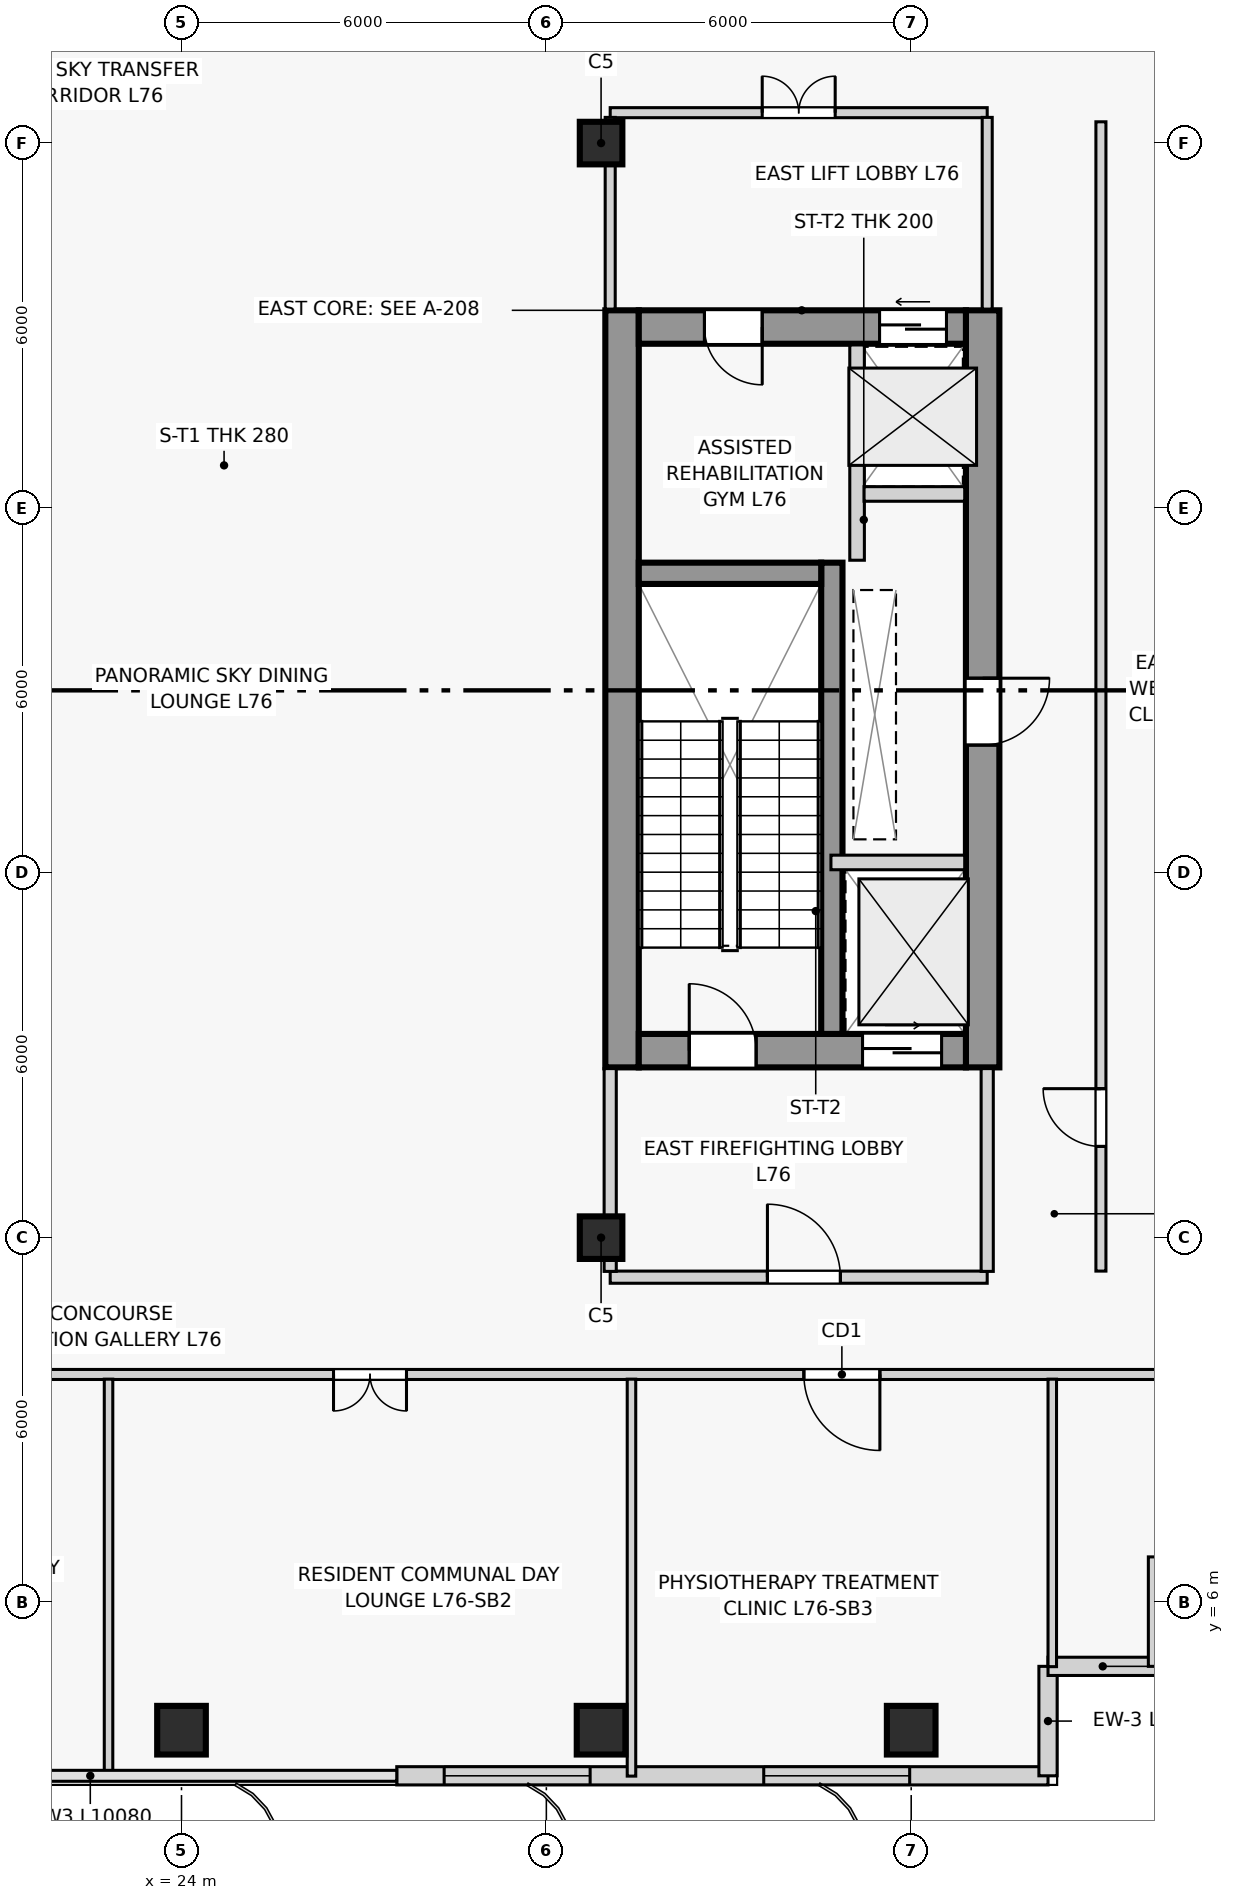
"""IFC4 building model, lengths in metres.
Left out: names, types, materials, properties, quantities, classifications, styles, units other than length and angle.
Written with IfcOpenShell. Run it as: python <this file> out.ifc"""

import sys

from ifc_helpers import new_model, si_unit, direction, frame, frame_2d, origin, origin_2d, place, context, subcontext, project, spatial, rectangle, extrude, source, transform, mapped, element, fill, save


model = new_model("IFC4")
c1 = context("Model", 3, precision=1e-05, world=origin(), true_north=direction((0.0, 1.0)))
c2 = subcontext(c1, "Body", "Model", "MODEL_VIEW")
j1 = project(units=[si_unit("LENGTHUNIT", "METRE"), si_unit("PLANEANGLEUNIT", "RADIAN")], contexts=[c1])
p1 = place(None, origin())
s1 = spatial("IfcSite", under=j1, at=p1, CompositionType="ELEMENT")
p2 = place(p1, origin())
s2 = spatial("IfcBuilding", under=s1, at=p2, CompositionType="ELEMENT")
p3 = place(p2, frame((0.0, 0.0, 289.5)))
s3 = spatial("IfcBuildingStorey", under=s2, at=p3, CompositionType="ELEMENT", Elevation=289.5)
p4 = place(p3, frame((31.245, 14.8, 0.0), z_axis=(0.0, 0.0, 1.0), x_axis=(0.0, 1.0, 0.0)))
e1 = element("IfcWall", 1, at=p4, inside=s3, PredefinedType="SHEAR", context=c2, shape_type="SweptSolid", body=[
    extrude(rectangle(XDim=12.45, YDim=0.55, at=frame_2d((6.225, 0.0))), origin(), (0.0, 0.0, 1.0), 4.2),
])
p5 = place(p3, frame((37.175, 14.8, 0.0), z_axis=(0.0, 0.0, 1.0), x_axis=(0.0, 1.0, 0.0)))
e2 = element("IfcWall", 2, at=p5, inside=s3, PredefinedType="SHEAR", context=c2, shape_type="SweptSolid", body=[
    extrude(rectangle(XDim=12.45, YDim=0.55, at=frame_2d((6.225, 0.0))), origin(), (0.0, 0.0, 1.0), 4.2),
])
p6 = place(p5, frame((5.3, 0.0, 0.0)))
e3 = element("IfcOpeningElement", 3, at=p6, cuts=e2, PredefinedType="OPENING", context=c2, shape_type="SweptSolid", body=[
    extrude(rectangle(XDim=1.1, YDim=2.2, at=frame_2d((0.55, 1.1))), frame((0.0, 0.285, 0.0), z_axis=(0.0, -1.0, 0.0), x_axis=(1.0, 0.0, 0.0)), (0.0, 0.0, 1.0), 0.57),
])
p7 = place(p3, frame((31.52, 15.075, 0.0), z_axis=(0.0, 0.0, 1.0), x_axis=(1.0, 0.0, 0.0)))
e4 = element("IfcWall", 4, at=p7, inside=s3, PredefinedType="SHEAR", context=c2, shape_type="SweptSolid", body=[
    extrude(rectangle(XDim=5.38, YDim=0.55, at=frame_2d((2.69, 0.0))), origin(), (0.0, 0.0, 1.0), 4.2),
])
p8 = place(p7, frame((0.83, 0.0, 0.0)))
e5 = element("IfcOpeningElement", 5, at=p8, cuts=e4, PredefinedType="OPENING", context=c2, shape_type="SweptSolid", body=[
    extrude(rectangle(XDim=1.1, YDim=2.2, at=frame_2d((0.55, 1.1))), frame((0.0, 0.285, 0.0), z_axis=(0.0, -1.0, 0.0), x_axis=(1.0, 0.0, 0.0)), (0.0, 0.0, 1.0), 0.57),
])
p9 = place(p7, frame((3.68, 0.0, 0.0)))
e6 = element("IfcOpeningElement", 6, at=p9, cuts=e4, PredefinedType="OPENING", context=c2, shape_type="SweptSolid", body=[
    extrude(rectangle(XDim=1.3, YDim=2.2, at=frame_2d((0.65, 1.1))), frame((0.0, 0.285, 0.0), z_axis=(0.0, -1.0, 0.0), x_axis=(1.0, 0.0, 0.0)), (0.0, 0.0, 1.0), 0.57),
])
p10 = place(p3, frame((31.52, 26.975, 0.0), z_axis=(0.0, 0.0, 1.0), x_axis=(1.0, 0.0, 0.0)))
e7 = element("IfcWall", 7, at=p10, inside=s3, PredefinedType="SHEAR", context=c2, shape_type="SweptSolid", body=[
    extrude(rectangle(XDim=5.38, YDim=0.55, at=frame_2d((2.69, 0.0))), origin(), (0.0, 0.0, 1.0), 4.2),
])
p11 = place(p10, frame((1.08, 0.0, 0.0)))
e8 = element("IfcOpeningElement", 8, at=p11, cuts=e7, PredefinedType="OPENING", context=c2, shape_type="SweptSolid", body=[
    extrude(rectangle(XDim=0.95, YDim=2.1, at=frame_2d((0.475, 1.05))), frame((0.0, 0.285, 0.0), z_axis=(0.0, -1.0, 0.0), x_axis=(1.0, 0.0, 0.0)), (0.0, 0.0, 1.0), 0.57),
])
p12 = place(p10, frame((3.96, 0.0, 0.0)))
e9 = element("IfcOpeningElement", 9, at=p12, cuts=e7, PredefinedType="OPENING", context=c2, shape_type="SweptSolid", body=[
    extrude(rectangle(XDim=1.1, YDim=2.2, at=frame_2d((0.55, 1.1))), frame((0.0, 0.285, 0.0), z_axis=(0.0, -1.0, 0.0), x_axis=(1.0, 0.0, 0.0)), (0.0, 0.0, 1.0), 0.57),
])
p13 = place(p3, frame((34.695, 15.35, 0.0), z_axis=(0.0, 0.0, 1.0), x_axis=(0.0, 1.0, 0.0)))
e10 = element("IfcWall", 10, at=p13, inside=s3, PredefinedType="SHEAR", context=c2, shape_type="SweptSolid", body=[
    extrude(rectangle(XDim=7.75, YDim=0.35, at=frame_2d((3.875, 0.0))), origin(), (0.0, 0.0, 1.0), 4.2),
])
p14 = place(p3, frame((31.52, 22.925, 0.0), z_axis=(0.0, 0.0, 1.0), x_axis=(1.0, 0.0, 0.0)))
e11 = element("IfcWall", 11, at=p14, inside=s3, PredefinedType="SHEAR", context=c2, shape_type="SweptSolid", body=[
    extrude(rectangle(XDim=3.0, YDim=0.35, at=frame_2d((1.5, 0.0))), origin(), (0.0, 0.0, 1.0), 4.2),
])
m1 = source(origin(), c2, "Body", "SweptSolid", [
    extrude(rectangle(XDim=0.8, YDim=0.8, at=origin_2d()), origin(), (0.0, 0.0, 1.0), 4.2),
])
for number, where, z_axis, x_axis in (
    (12, (24.0, 3.9, 0.0), (0.0, 0.0, 1.0), (1.0, 0.0, 0.0)),
    (13, (30.9, 3.9, 0.0), (0.0, 0.0, 1.0), (1.0, 0.0, 0.0)),
    (14, (36.0, 3.9, 0.0), (0.0, 0.0, 1.0), (1.0, 0.0, 0.0)),
):
    element("IfcColumn", number, at=place(p3, frame(where, z_axis=z_axis, x_axis=x_axis)), inside=s3, PredefinedType="COLUMN", context=c2, shape_type="MappedRepresentation", body=[
        mapped(m1, transform((0.0, 0.0, 0.0), scale=1.0)),
    ])
m2 = source(origin(), c2, "Body", "SweptSolid", [
    extrude(rectangle(XDim=0.7, YDim=0.7, at=origin_2d()), origin(), (0.0, 0.0, 1.0), 4.2),
])
for number, where, z_axis, x_axis in (
    (15, (30.9, 12.0, 0.0), (0.0, 0.0, 1.0), (1.0, 0.0, 0.0)),
    (16, (30.9, 30.0, 0.0), (0.0, 0.0, 1.0), (1.0, 0.0, 0.0)),
):
    element("IfcColumn", number, at=place(p3, frame(where, z_axis=z_axis, x_axis=x_axis)), inside=s3, PredefinedType="COLUMN", context=c2, shape_type="MappedRepresentation", body=[
        mapped(m2, transform((0.0, 0.0, 0.0), scale=1.0)),
    ])
p15 = place(p3, frame((27.54, 3.15, 0.0), z_axis=(0.0, 0.0, 1.0), x_axis=(1.0, 0.0, 0.0)))
e17 = element("IfcWall", 17, at=p15, inside=s3, PredefinedType="SOLIDWALL", context=c2, shape_type="SweptSolid", body=[
    extrude(rectangle(XDim=10.71, YDim=0.3, at=frame_2d((5.355, 0.0))), origin(), (0.0, 0.0, 1.0), 3.92),
])
p16 = place(p15, frame((0.78, 0.0, 0.8)))
e18 = element("IfcOpeningElement", 18, at=p16, cuts=e17, PredefinedType="OPENING", context=c2, shape_type="SweptSolid", body=[
    extrude(rectangle(XDim=2.4, YDim=2.1, at=frame_2d((1.2, 1.05))), frame((0.0, 0.16, 0.0), z_axis=(0.0, -1.0, 0.0), x_axis=(1.0, 0.0, 0.0)), (0.0, 0.0, 1.0), 0.32),
])
p17 = place(p15, frame((6.035, 0.0, 0.8)))
e19 = element("IfcOpeningElement", 19, at=p17, cuts=e17, PredefinedType="OPENING", context=c2, shape_type="SweptSolid", body=[
    extrude(rectangle(XDim=2.4, YDim=2.1, at=frame_2d((1.2, 1.05))), frame((0.0, 0.16, 0.0), z_axis=(0.0, -1.0, 0.0), x_axis=(1.0, 0.0, 0.0)), (0.0, 0.0, 1.0), 0.32),
])
for number, where, z_axis, x_axis in (
    (20, (38.25, 3.15, 0.0), (0.0, 0.0, 1.0), (0.0, 1.0, 0.0)),
    (21, (38.25, 4.95, 0.0), (0.0, 0.0, 1.0), (1.0, 0.0, 0.0)),
    (22, (40.05, 4.95, 0.0), (0.0, 0.0, 1.0), (0.0, 1.0, 0.0)),
):
    element("IfcWall", number, at=place(p3, frame(where, z_axis=z_axis, x_axis=x_axis)), inside=s3, PredefinedType="SOLIDWALL", context=c2, shape_type="SweptSolid", body=[
        extrude(rectangle(XDim=1.8, YDim=0.3, at=frame_2d((0.9, 0.0))), origin(), (0.0, 0.0, 1.0), 3.92),
    ])
p18 = place(p3, frame((34.68, 18.17, 0.0), z_axis=(0.0, 0.0, 1.0), x_axis=(1.0, 0.0, 0.0)))
e23 = element("IfcWall", 23, at=p18, inside=s3, PredefinedType="PARTITIONING", context=c2, shape_type="SweptSolid", body=[
    extrude(rectangle(XDim=2.2, YDim=0.24, at=frame_2d((1.1, 0.0))), origin(), (0.0, 0.0, 1.0), 3.92),
])
p19 = place(p3, frame((31.05, 11.35, 0.0), z_axis=(0.0, 0.0, 1.0), x_axis=(1.0, 0.0, 0.0)))
e24 = element("IfcWall", 24, at=p19, inside=s3, PredefinedType="PARTITIONING", context=c2, shape_type="SweptSolid", body=[
    extrude(rectangle(XDim=6.2, YDim=0.2, at=frame_2d((3.1, 0.0))), origin(), (0.0, 0.0, 1.0), 3.92),
])
p20 = place(p19, frame((2.586, 0.0, 0.0)))
e25 = element("IfcOpeningElement", 25, at=p20, cuts=e24, PredefinedType="OPENING", context=c2, shape_type="SweptSolid", body=[
    extrude(rectangle(XDim=1.2, YDim=2.2, at=frame_2d((0.6, 1.1))), frame((0.0, 0.11, 0.0), z_axis=(0.0, -1.0, 0.0), x_axis=(1.0, 0.0, 0.0)), (0.0, 0.0, 1.0), 0.22),
])
p21 = place(p3, frame((31.05, 11.445, 0.0), z_axis=(0.0, 0.0, 1.0), x_axis=(0.0, 1.0, 0.0)))
e26 = element("IfcWall", 26, at=p21, inside=s3, PredefinedType="PARTITIONING", context=c2, shape_type="SweptSolid", body=[
    extrude(rectangle(XDim=3.335, YDim=0.2, at=frame_2d((1.667, 0.0))), origin(), (0.0, 0.0, 1.0), 3.07),
])
p22 = place(p3, frame((37.25, 11.445, 0.0), z_axis=(0.0, 0.0, 1.0), x_axis=(0.0, 1.0, 0.0)))
e27 = element("IfcWall", 27, at=p22, inside=s3, PredefinedType="PARTITIONING", context=c2, shape_type="SweptSolid", body=[
    extrude(rectangle(XDim=3.335, YDim=0.2, at=frame_2d((1.667, 0.0))), origin(), (0.0, 0.0, 1.0), 3.92),
])
p23 = place(p3, frame((35.11, 23.14, 0.0), z_axis=(0.0, 0.0, 1.0), x_axis=(0.0, 1.0, 0.0)))
e28 = element("IfcWall", 28, at=p23, inside=s3, PredefinedType="PARTITIONING", context=c2, shape_type="SweptSolid", body=[
    extrude(rectangle(XDim=3.54, YDim=0.24, at=frame_2d((1.77, 0.0))), origin(), (0.0, 0.0, 1.0), 3.92),
])
p24 = place(p3, frame((35.225, 24.23, 0.0), z_axis=(0.0, 0.0, 1.0), x_axis=(1.0, 0.0, 0.0)))
e29 = element("IfcWall", 29, at=p24, inside=s3, PredefinedType="PARTITIONING", context=c2, shape_type="SweptSolid", body=[
    extrude(rectangle(XDim=1.655, YDim=0.24, at=frame_2d((0.827, 0.0))), origin(), (0.0, 0.0, 1.0), 3.92),
])
p25 = place(p3, frame((31.05, 30.5, 0.0), z_axis=(0.0, 0.0, 1.0), x_axis=(1.0, 0.0, 0.0)))
e30 = element("IfcWall", 30, at=p25, inside=s3, PredefinedType="PARTITIONING", context=c2, shape_type="SweptSolid", body=[
    extrude(rectangle(XDim=6.2, YDim=0.165, at=frame_2d((3.1, 0.0))), origin(), (0.0, 0.0, 1.0), 3.92),
])
p26 = place(p25, frame((2.5, 0.0, 0.0)))
e31 = element("IfcOpeningElement", 31, at=p26, cuts=e30, PredefinedType="OPENING", context=c2, shape_type="SweptSolid", body=[
    extrude(rectangle(XDim=1.2, YDim=2.2, at=frame_2d((0.6, 1.1))), frame((0.0, 0.093, 0.0), z_axis=(0.0, -1.0, 0.0), x_axis=(1.0, 0.0, 0.0)), (0.0, 0.0, 1.0), 0.185),
])
for number, where, z_axis, x_axis in (
    (32, (31.05, 27.27, 0.0), (0.0, 0.0, 1.0), (0.0, 1.0, 0.0)),
    (33, (37.25, 27.27, 0.0), (0.0, 0.0, 1.0), (0.0, 1.0, 0.0)),
):
    element("IfcWall", number, at=place(p3, frame(where, z_axis=z_axis, x_axis=x_axis)), inside=s3, PredefinedType="PARTITIONING", context=c2, shape_type="SweptSolid", body=[
        extrude(rectangle(XDim=3.153, YDim=0.165, at=frame_2d((1.576, 0.0))), origin(), (0.0, 0.0, 1.0), 3.92),
    ])
p27 = place(p3, frame((3.145, 9.75, 0.0), z_axis=(0.0, 0.0, 1.0), x_axis=(1.0, 0.0, 0.0)))
e34 = element("IfcWall", 34, at=p27, inside=s3, PredefinedType="PARTITIONING", context=c2, shape_type="SweptSolid", body=[
    extrude(rectangle(XDim=38.71, YDim=0.165, at=frame_2d((19.355, 0.0))), origin(), (0.0, 0.0, 1.0), 3.92),
])
p28 = place(p27, frame((4.892, 0.0, 0.0)))
e35 = element("IfcOpeningElement", 35, at=p28, cuts=e34, PredefinedType="OPENING", context=c2, shape_type="SweptSolid", body=[
    extrude(rectangle(XDim=1.05, YDim=2.15, at=frame_2d((0.525, 1.075))), frame((0.0, 0.093, 0.0), z_axis=(0.0, -1.0, 0.0), x_axis=(1.0, 0.0, 0.0)), (0.0, 0.0, 1.0), 0.185),
])
p29 = place(p27, frame((14.355, 0.0, 0.0)))
e36 = element("IfcOpeningElement", 36, at=p29, cuts=e34, PredefinedType="OPENING", context=c2, shape_type="SweptSolid", body=[
    extrude(rectangle(XDim=1.2, YDim=2.2, at=frame_2d((0.6, 1.1))), frame((0.0, 0.093, 0.0), z_axis=(0.0, -1.0, 0.0), x_axis=(1.0, 0.0, 0.0)), (0.0, 0.0, 1.0), 0.185),
])
p30 = place(p27, frame((23.355, 0.0, 0.0)))
e37 = element("IfcOpeningElement", 37, at=p30, cuts=e34, PredefinedType="OPENING", context=c2, shape_type="SweptSolid", body=[
    extrude(rectangle(XDim=1.2, YDim=2.2, at=frame_2d((0.6, 1.1))), frame((0.0, 0.093, 0.0), z_axis=(0.0, -1.0, 0.0), x_axis=(1.0, 0.0, 0.0)), (0.0, 0.0, 1.0), 0.185),
])
p31 = place(p27, frame((31.09, 0.0, 0.0)))
e38 = element("IfcOpeningElement", 38, at=p31, cuts=e34, PredefinedType="OPENING", context=c2, shape_type="SweptSolid", body=[
    extrude(rectangle(XDim=1.25, YDim=2.2, at=frame_2d((0.625, 1.1))), frame((0.0, 0.093, 0.0), z_axis=(0.0, -1.0, 0.0), x_axis=(1.0, 0.0, 0.0)), (0.0, 0.0, 1.0), 0.185),
])
p32 = place(p3, frame((39.12, 11.45, 0.0), z_axis=(0.0, 0.0, 1.0), x_axis=(0.0, 1.0, 0.0)))
e39 = element("IfcWall", 39, at=p32, inside=s3, PredefinedType="PARTITIONING", context=c2, shape_type="SweptSolid", body=[
    extrude(rectangle(XDim=18.9, YDim=0.165, at=frame_2d((9.45, 0.0))), origin(), (0.0, 0.0, 1.0), 3.92),
])
p33 = place(p32, frame((2.05, 0.0, 0.0)))
e40 = element("IfcOpeningElement", 40, at=p33, cuts=e39, PredefinedType="OPENING", context=c2, shape_type="SweptSolid", body=[
    extrude(rectangle(XDim=0.95, YDim=2.1, at=frame_2d((0.475, 1.05))), frame((0.0, 0.093, 0.0), z_axis=(0.0, -1.0, 0.0), x_axis=(1.0, 0.0, 0.0)), (0.0, 0.0, 1.0), 0.185),
])
for number, where, z_axis, x_axis in (
    (41, (22.8, 3.145, 0.0), (0.0, 0.0, 1.0), (0.0, 1.0, 0.0)),
    (42, (31.4, 3.145, 0.0), (0.0, 0.0, 1.0), (0.0, 1.0, 0.0)),
):
    element("IfcWall", number, at=place(p3, frame(where, z_axis=z_axis, x_axis=x_axis)), inside=s3, PredefinedType="PARTITIONING", context=c2, shape_type="SweptSolid", body=[
        extrude(rectangle(XDim=6.528, YDim=0.14, at=frame_2d((3.264, 0.0))), origin(), (0.0, 0.0, 1.0), 3.92),
    ])
p34 = place(p3, frame((38.32, 4.945, 0.0), z_axis=(0.0, 0.0, 1.0), x_axis=(0.0, 1.0, 0.0)))
e43 = element("IfcWall", 43, at=p34, inside=s3, PredefinedType="PARTITIONING", context=c2, shape_type="SweptSolid", body=[
    extrude(rectangle(XDim=4.728, YDim=0.14, at=frame_2d((2.364, 0.0))), origin(), (0.0, 0.0, 1.0), 3.92),
])
m3 = source(origin(), c2, "Body", "SweptSolid", [
    extrude(rectangle(XDim=2.4, YDim=2.1, at=frame_2d((1.2, 1.05))), frame((0.0, 0.03, 0.0), z_axis=(0.0, -1.0, 0.0), x_axis=(1.0, 0.0, 0.0)), (0.0, 0.0, 1.0), 0.06),
])
p35 = place(p16, origin())
e44 = element("IfcWindow", 44, at=p35, inside=s3, PartitioningType="SINGLE_PANEL", PredefinedType="WINDOW", context=c2, shape_type="MappedRepresentation", body=[
    mapped(m3, transform((0.0, 0.0, 0.0), scale=1.0)),
])
fill(e18, e44)
p36 = place(p17, origin())
e45 = element("IfcWindow", 45, at=p36, inside=s3, PartitioningType="SINGLE_PANEL", PredefinedType="WINDOW", context=c2, shape_type="MappedRepresentation", body=[
    mapped(m3, transform((0.0, 0.0, 0.0), scale=1.0)),
])
fill(e19, e45)
m4 = source(origin(), c2, "Body", "SweptSolid", [
    extrude(rectangle(XDim=1.1, YDim=2.2, at=frame_2d((0.55, 1.1))), frame((0.0, 0.025, 0.0), z_axis=(0.0, -1.0, 0.0), x_axis=(1.0, 0.0, 0.0)), (0.0, 0.0, 1.0), 0.05),
])
p37 = place(p8, origin())
e46 = element("IfcDoor", 46, at=p37, inside=s3, OperationType="SINGLE_SWING_LEFT", PredefinedType="DOOR", context=c2, shape_type="MappedRepresentation", body=[
    mapped(m4, transform((0.0, 0.0, 0.0), scale=1.0)),
])
fill(e5, e46)
m5 = source(origin(), c2, "Body", "SweptSolid", [
    extrude(rectangle(XDim=1.3, YDim=2.2, at=frame_2d((0.65, 1.1))), frame((0.0, 0.025, 0.0), z_axis=(0.0, -1.0, 0.0), x_axis=(1.0, 0.0, 0.0)), (0.0, 0.0, 1.0), 0.05),
])
p38 = place(p9, origin())
e47 = element("IfcDoor", 47, at=p38, inside=s3, OperationType="SLIDING_TO_RIGHT", PredefinedType="DOOR", context=c2, shape_type="MappedRepresentation", body=[
    mapped(m5, transform((0.0, 0.0, 0.0), scale=1.0)),
])
fill(e6, e47)
m6 = source(origin(), c2, "Body", "SweptSolid", [
    extrude(rectangle(XDim=1.2, YDim=2.2, at=frame_2d((0.6, 1.1))), frame((0.0, 0.025, 0.0), z_axis=(0.0, -1.0, 0.0), x_axis=(1.0, 0.0, 0.0)), (0.0, 0.0, 1.0), 0.05),
])
p39 = place(p20, origin())
e48 = element("IfcDoor", 48, at=p39, inside=s3, OperationType="SINGLE_SWING_LEFT", PredefinedType="DOOR", context=c2, shape_type="MappedRepresentation", body=[
    mapped(m6, transform((0.0, 0.0, 0.0), scale=1.0)),
])
fill(e25, e48)
m7 = source(origin(), c2, "Body", "SweptSolid", [
    extrude(rectangle(XDim=0.95, YDim=2.1, at=frame_2d((0.475, 1.05))), frame((0.0, 0.025, 0.0), z_axis=(0.0, -1.0, 0.0), x_axis=(1.0, 0.0, 0.0)), (0.0, 0.0, 1.0), 0.05),
])
p40 = place(p11, frame((0.95, 0.0, 0.0), z_axis=(0.0, 0.0, 1.0), x_axis=(-1.0, 0.0, 0.0)))
e49 = element("IfcDoor", 49, at=p40, inside=s3, OperationType="SINGLE_SWING_LEFT", PredefinedType="DOOR", context=c2, shape_type="MappedRepresentation", body=[
    mapped(m7, transform((0.0, 0.0, 0.0), scale=1.0)),
])
fill(e8, e49)
m8 = source(origin(), c2, "Body", "SweptSolid", [
    extrude(rectangle(XDim=1.1, YDim=2.2, at=frame_2d((0.55, 1.1))), frame((0.0, 0.025, 0.0), z_axis=(0.0, -1.0, 0.0), x_axis=(1.0, 0.0, 0.0)), (0.0, 0.0, 1.0), 0.05),
])
p41 = place(p12, origin())
e50 = element("IfcDoor", 50, at=p41, inside=s3, OperationType="SLIDING_TO_LEFT", PredefinedType="DOOR", context=c2, shape_type="MappedRepresentation", body=[
    mapped(m8, transform((0.0, 0.0, 0.0), scale=1.0)),
])
fill(e9, e50)
p42 = place(p26, origin())
e51 = element("IfcDoor", 51, at=p42, inside=s3, OperationType="DOUBLE_DOOR_SINGLE_SWING", PredefinedType="DOOR", context=c2, shape_type="MappedRepresentation", body=[
    mapped(m6, transform((0.0, 0.0, 0.0), scale=1.0)),
])
fill(e31, e51)
p43 = place(p6, frame((1.1, 0.0, 0.0), z_axis=(0.0, 0.0, 1.0), x_axis=(-1.0, 0.0, 0.0)))
e52 = element("IfcDoor", 52, at=p43, inside=s3, OperationType="SINGLE_SWING_LEFT", PredefinedType="DOOR", context=c2, shape_type="MappedRepresentation", body=[
    mapped(m4, transform((0.0, 0.0, 0.0), scale=1.0)),
])
fill(e3, e52)
p44 = place(p33, origin())
e53 = element("IfcDoor", 53, at=p44, inside=s3, OperationType="SINGLE_SWING_RIGHT", PredefinedType="DOOR", context=c2, shape_type="MappedRepresentation", body=[
    mapped(m7, transform((0.0, 0.0, 0.0), scale=1.0)),
])
fill(e40, e53)
p45 = place(p30, frame((1.2, 0.0, 0.0), z_axis=(0.0, 0.0, 1.0), x_axis=(-1.0, 0.0, 0.0)))
e54 = element("IfcDoor", 54, at=p45, inside=s3, OperationType="DOUBLE_DOOR_SINGLE_SWING", PredefinedType="DOOR", context=c2, shape_type="MappedRepresentation", body=[
    mapped(m6, transform((0.0, 0.0, 0.0), scale=1.0)),
])
fill(e37, e54)
m9 = source(origin(), c2, "Body", "SweptSolid", [
    extrude(rectangle(XDim=1.25, YDim=2.2, at=frame_2d((0.625, 1.1))), frame((0.0, 0.025, 0.0), z_axis=(0.0, -1.0, 0.0), x_axis=(1.0, 0.0, 0.0)), (0.0, 0.0, 1.0), 0.05),
])
p46 = place(p31, frame((1.25, 0.0, 0.0), z_axis=(0.0, 0.0, 1.0), x_axis=(-1.0, 0.0, 0.0)))
e55 = element("IfcDoor", 55, at=p46, inside=s3, OperationType="SINGLE_SWING_LEFT", PredefinedType="DOOR", context=c2, shape_type="MappedRepresentation", body=[
    mapped(m9, transform((0.0, 0.0, 0.0), scale=1.0)),
])
fill(e38, e55)
save(model, sys.argv[1])
